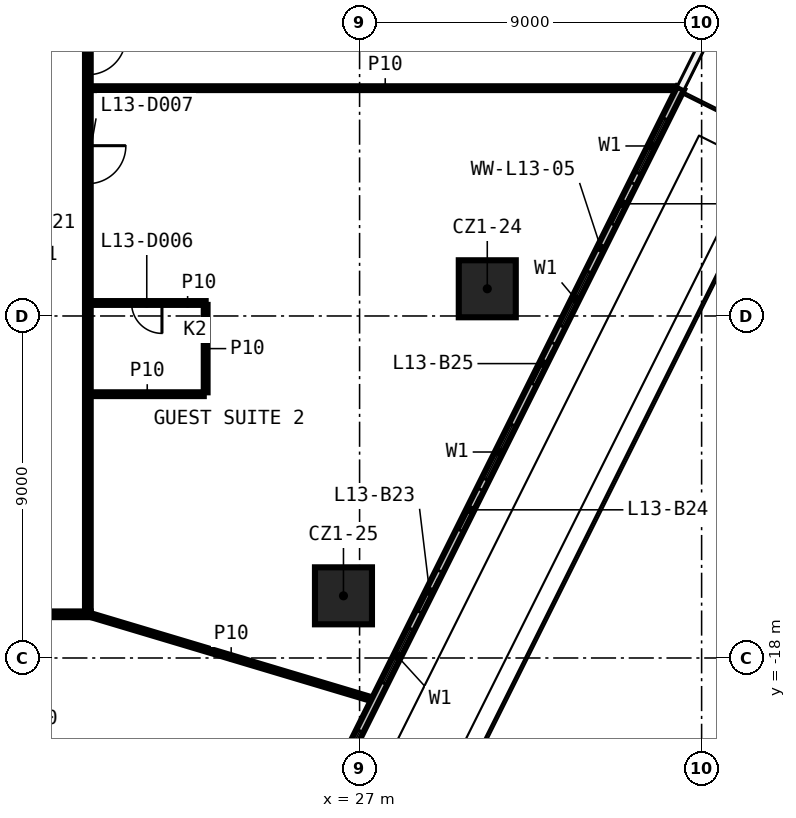
"""IFC4 building model, lengths in metres.
Left out: names, types, materials, properties, quantities, classifications, styles, units other than length and angle.
Written with IfcOpenShell. Run it as: python <this file> out.ifc"""

import sys

from ifc_helpers import new_model, si_unit, direction, frame, frame_2d, origin, origin_2d, place, context, subcontext, project, spatial, rectangle, extrude, element, fill, save


model = new_model("IFC4")
c1 = context("Model", 3, precision=1e-05, world=origin(), true_north=direction((0.0, 1.0)))
c2 = subcontext(c1, "Body", "Model", "MODEL_VIEW")
j1 = project(units=[si_unit("LENGTHUNIT", "METRE"), si_unit("PLANEANGLEUNIT", "RADIAN")], contexts=[c1])
p1 = place(None, origin())
s1 = spatial("IfcSite", under=j1, at=p1, CompositionType="ELEMENT")
p2 = place(p1, origin())
s2 = spatial("IfcBuilding", under=s1, at=p2, CompositionType="ELEMENT")
p3 = place(p2, frame((0.0, 0.0, 69.9)))
s3 = spatial("IfcBuildingStorey", under=s2, at=p3, CompositionType="ELEMENT", Elevation=69.9)
for number, where, z_axis, x_axis in (
    (1, (30.36, -8.284, 0.0), (0.0, 0.0, 1.0), (1.0, 0.0, 0.0)),
    (2, (26.576, -16.364, 0.0), (0.0, 0.0, 1.0), (1.0, 0.0, 0.0)),
):
    element("IfcColumn", number, at=place(p3, frame(where, z_axis=z_axis, x_axis=x_axis)), inside=s3, PredefinedType="COLUMN", context=c2, shape_type="SweptSolid", body=[
        extrude(rectangle(XDim=1.5, YDim=1.5, at=origin_2d()), origin(), (0.0, 0.0, 1.0), 3.3),
    ])
p4 = place(p3, frame((19.925, -16.85, 0.0), z_axis=(0.0, 0.0, 1.0), x_axis=(-1.0, 0.0, 0.0)))
e3 = element("IfcWall", 3, at=p4, inside=s3, PredefinedType="PARTITIONING", context=c2, shape_type="SweptSolid", body=[
    extrude(rectangle(XDim=39.85, YDim=0.15, at=frame_2d((19.925, 0.0))), origin(), (0.0, 0.0, 1.0), 3.3),
])
p5 = place(p4, frame((30.959, 0.0, 0.0)))
e4 = element("IfcOpeningElement", 4, at=p5, cuts=e3, PredefinedType="OPENING", context=c2, shape_type="SweptSolid", body=[
    extrude(rectangle(XDim=0.9, YDim=2.1, at=frame_2d((0.45, 1.05))), frame((0.0, 0.085, 0.0), z_axis=(0.0, -1.0, 0.0), x_axis=(1.0, 0.0, 0.0)), (0.0, 0.0, 1.0), 0.17),
])
p6 = place(p4, frame((22.077, 0.0, 0.0)))
e5 = element("IfcOpeningElement", 5, at=p6, cuts=e3, PredefinedType="OPENING", context=c2, shape_type="SweptSolid", body=[
    extrude(rectangle(XDim=0.9, YDim=2.1, at=frame_2d((0.45, 1.05))), frame((0.0, 0.085, 0.0), z_axis=(0.0, -1.0, 0.0), x_axis=(1.0, 0.0, 0.0)), (0.0, 0.0, 1.0), 0.17),
])
p7 = place(p3, frame((19.925, -11.058, 0.0), z_axis=(0.0, 0.0, 1.0), x_axis=(1.0, 0.0, 0.0)))
e6 = element("IfcWall", 6, at=p7, inside=s3, PredefinedType="PARTITIONING", context=c2, shape_type="SweptSolid", body=[
    extrude(rectangle(XDim=2.975, YDim=0.1, at=frame_2d((1.487, 0.0))), origin(), (0.0, 0.0, 1.0), 3.3),
])
p8 = place(p3, frame((22.95, -8.658, 0.0), z_axis=(0.0, 0.0, 1.0), x_axis=(-1.0, 0.0, 0.0)))
e7 = element("IfcWall", 7, at=p8, inside=s3, PredefinedType="PARTITIONING", context=c2, shape_type="SweptSolid", body=[
    extrude(rectangle(XDim=3.025, YDim=0.1, at=frame_2d((1.512, 0.0))), origin(), (0.0, 0.0, 1.0), 3.3),
])
p9 = place(p8, frame((1.15, 0.0, 0.0)))
e8 = element("IfcOpeningElement", 8, at=p9, cuts=e7, PredefinedType="OPENING", context=c2, shape_type="SweptSolid", body=[
    extrude(rectangle(XDim=0.8, YDim=2.1, at=frame_2d((0.4, 1.05))), frame((0.0, 0.06, 0.0), z_axis=(0.0, -1.0, 0.0), x_axis=(1.0, 0.0, 0.0)), (0.0, 0.0, 1.0), 0.12),
])
p10 = place(p3, frame((19.925, -3.005, 0.0), z_axis=(0.0, 0.0, 1.0), x_axis=(1.0, 0.0, 0.0)))
e9 = element("IfcWall", 9, at=p10, inside=s3, PredefinedType="PARTITIONING", context=c2, shape_type="SweptSolid", body=[
    extrude(rectangle(XDim=15.5, YDim=0.1, at=frame_2d((7.75, 0.0))), origin(), (0.0, 0.0, 1.0), 3.3),
])
p11 = place(p3, frame((22.95, -11.009, 0.0), z_axis=(0.0, 0.0, 1.0), x_axis=(0.0, 1.0, 0.0)))
e10 = element("IfcWall", 10, at=p11, inside=s3, PredefinedType="PARTITIONING", context=c2, shape_type="SweptSolid", body=[
    extrude(rectangle(XDim=2.3, YDim=0.1, at=frame_2d((1.15, 0.0))), origin(), (0.0, 0.0, 1.0), 3.3),
])
p12 = place(p3, frame((19.85, 16.775, 0.0), z_axis=(0.0, 0.0, 1.0), x_axis=(0.0, -1.0, 0.0)))
e11 = element("IfcWall", 11, at=p12, inside=s3, PredefinedType="PARTITIONING", context=c2, shape_type="SweptSolid", body=[
    extrude(rectangle(XDim=33.55, YDim=0.15, at=frame_2d((16.775, 0.0))), origin(), (0.0, 0.0, 1.0), 3.3),
])
p13 = place(p12, frame((21.293, 0.0, 0.0)))
e12 = element("IfcOpeningElement", 12, at=p13, cuts=e11, PredefinedType="OPENING", context=c2, shape_type="SweptSolid", body=[
    extrude(rectangle(XDim=1.0, YDim=2.1, at=frame_2d((0.5, 1.05))), frame((0.0, 0.085, 0.0), z_axis=(0.0, -1.0, 0.0), x_axis=(1.0, 0.0, 0.0)), (0.0, 0.0, 1.0), 0.17),
])
p14 = place(p12, frame((18.427, 0.0, 0.0)))
e13 = element("IfcOpeningElement", 13, at=p14, cuts=e11, PredefinedType="OPENING", context=c2, shape_type="SweptSolid", body=[
    extrude(rectangle(XDim=1.0, YDim=2.1, at=frame_2d((0.5, 1.05))), frame((0.0, 0.085, 0.0), z_axis=(0.0, -1.0, 0.0), x_axis=(1.0, 0.0, 0.0)), (0.0, 0.0, 1.0), 0.17),
])
p15 = place(p12, frame((4.211, 0.0, 0.0)))
e14 = element("IfcOpeningElement", 14, at=p15, cuts=e11, PredefinedType="OPENING", context=c2, shape_type="SweptSolid", body=[
    extrude(rectangle(XDim=0.9, YDim=2.1, at=frame_2d((0.45, 1.05))), frame((0.0, 0.085, 0.0), z_axis=(0.0, -1.0, 0.0), x_axis=(1.0, 0.0, 0.0)), (0.0, 0.0, 1.0), 0.17),
])
p16 = place(p3, frame((19.85, -16.85, 0.0), z_axis=(0.0, 0.0, 1.0), x_axis=(0.958075156501, -0.286517005597, 0.0)))
e15 = element("IfcWall", 15, at=p16, inside=s3, PredefinedType="PARTITIONING", context=c2, shape_type="SweptSolid", body=[
    extrude(rectangle(XDim=7.873, YDim=0.1, at=frame_2d((3.936, 0.0))), origin(), (0.0, 0.0, 1.0), 3.3),
])
p17 = place(p3, frame((23.394, -27.165, 0.0), z_axis=(0.0, 0.0, 1.0), x_axis=(0.446421309396, 0.894822895615, 0.0)))
e16 = element("IfcWall", 16, at=p17, inside=s3, PredefinedType="SOLIDWALL", context=c2, shape_type="SweptSolid", body=[
    extrude(rectangle(XDim=27.0, YDim=0.2, at=frame_2d((13.5, 0.0))), origin(), (0.0, 0.0, 1.0), 3.3),
])
p18 = place(p17, frame((0.5, 0.0, 0.6)))
e17 = element("IfcOpeningElement", 17, at=p18, cuts=e16, PredefinedType="OPENING", context=c2, shape_type="SweptSolid", body=[
    extrude(rectangle(XDim=1.6, YDim=2.4, at=frame_2d((0.8, 1.2))), frame((0.0, 0.11, 0.0), z_axis=(0.0, -1.0, 0.0), x_axis=(1.0, 0.0, 0.0)), (0.0, 0.0, 1.0), 0.22),
])
p19 = place(p17, frame((3.0, 0.0, 0.0)))
e18 = element("IfcOpeningElement", 18, at=p19, cuts=e16, PredefinedType="OPENING", context=c2, shape_type="SweptSolid", body=[
    extrude(rectangle(XDim=1.2, YDim=2.4, at=frame_2d((0.6, 1.2))), frame((0.0, 0.11, 0.0), z_axis=(0.0, -1.0, 0.0), x_axis=(1.0, 0.0, 0.0)), (0.0, 0.0, 1.0), 0.22),
])
p20 = place(p17, frame((6.5, 0.0, 0.6)))
e19 = element("IfcOpeningElement", 19, at=p20, cuts=e16, PredefinedType="OPENING", context=c2, shape_type="SweptSolid", body=[
    extrude(rectangle(XDim=1.6, YDim=2.4, at=frame_2d((0.8, 1.2))), frame((0.0, 0.11, 0.0), z_axis=(0.0, -1.0, 0.0), x_axis=(1.0, 0.0, 0.0)), (0.0, 0.0, 1.0), 0.22),
])
p21 = place(p17, frame((5.0, 0.0, 0.0)))
e20 = element("IfcOpeningElement", 20, at=p21, cuts=e16, PredefinedType="OPENING", context=c2, shape_type="SweptSolid", body=[
    extrude(rectangle(XDim=1.2, YDim=2.4, at=frame_2d((0.6, 1.2))), frame((0.0, 0.11, 0.0), z_axis=(0.0, -1.0, 0.0), x_axis=(1.0, 0.0, 0.0)), (0.0, 0.0, 1.0), 0.22),
])
p22 = place(p17, frame((9.5, 0.0, 0.6)))
e21 = element("IfcOpeningElement", 21, at=p22, cuts=e16, PredefinedType="OPENING", context=c2, shape_type="SweptSolid", body=[
    extrude(rectangle(XDim=1.6, YDim=2.4, at=frame_2d((0.8, 1.2))), frame((0.0, 0.11, 0.0), z_axis=(0.0, -1.0, 0.0), x_axis=(1.0, 0.0, 0.0)), (0.0, 0.0, 1.0), 0.22),
])
p23 = place(p17, frame((11.6, 0.0, 0.0)))
e22 = element("IfcOpeningElement", 22, at=p23, cuts=e16, PredefinedType="OPENING", context=c2, shape_type="SweptSolid", body=[
    extrude(rectangle(XDim=1.2, YDim=2.4, at=frame_2d((0.6, 1.2))), frame((0.0, 0.11, 0.0), z_axis=(0.0, -1.0, 0.0), x_axis=(1.0, 0.0, 0.0)), (0.0, 0.0, 1.0), 0.22),
])
p24 = place(p17, frame((15.5, 0.0, 0.6)))
e23 = element("IfcOpeningElement", 23, at=p24, cuts=e16, PredefinedType="OPENING", context=c2, shape_type="SweptSolid", body=[
    extrude(rectangle(XDim=1.6, YDim=2.4, at=frame_2d((0.8, 1.2))), frame((0.0, 0.11, 0.0), z_axis=(0.0, -1.0, 0.0), x_axis=(1.0, 0.0, 0.0)), (0.0, 0.0, 1.0), 0.22),
])
p25 = place(p17, frame((14.0, 0.0, 0.0)))
e24 = element("IfcOpeningElement", 24, at=p25, cuts=e16, PredefinedType="OPENING", context=c2, shape_type="SweptSolid", body=[
    extrude(rectangle(XDim=1.2, YDim=2.4, at=frame_2d((0.6, 1.2))), frame((0.0, 0.11, 0.0), z_axis=(0.0, -1.0, 0.0), x_axis=(1.0, 0.0, 0.0)), (0.0, 0.0, 1.0), 0.22),
])
p26 = place(p17, frame((20.0, 0.0, 0.6)))
e25 = element("IfcOpeningElement", 25, at=p26, cuts=e16, PredefinedType="OPENING", context=c2, shape_type="SweptSolid", body=[
    extrude(rectangle(XDim=1.6, YDim=2.4, at=frame_2d((0.8, 1.2))), frame((0.0, 0.11, 0.0), z_axis=(0.0, -1.0, 0.0), x_axis=(1.0, 0.0, 0.0)), (0.0, 0.0, 1.0), 0.22),
])
p27 = place(p17, frame((18.3, 0.0, 0.0)))
e26 = element("IfcOpeningElement", 26, at=p27, cuts=e16, PredefinedType="OPENING", context=c2, shape_type="SweptSolid", body=[
    extrude(rectangle(XDim=1.2, YDim=2.4, at=frame_2d((0.6, 1.2))), frame((0.0, 0.11, 0.0), z_axis=(0.0, -1.0, 0.0), x_axis=(1.0, 0.0, 0.0)), (0.0, 0.0, 1.0), 0.22),
])
p28 = place(p17, frame((24.5, 0.0, 0.6)))
e27 = element("IfcOpeningElement", 27, at=p28, cuts=e16, PredefinedType="OPENING", context=c2, shape_type="SweptSolid", body=[
    extrude(rectangle(XDim=1.6, YDim=2.4, at=frame_2d((0.8, 1.2))), frame((0.0, 0.11, 0.0), z_axis=(0.0, -1.0, 0.0), x_axis=(1.0, 0.0, 0.0)), (0.0, 0.0, 1.0), 0.22),
])
p29 = place(p17, frame((23.0, 0.0, 0.0)))
e28 = element("IfcOpeningElement", 28, at=p29, cuts=e16, PredefinedType="OPENING", context=c2, shape_type="SweptSolid", body=[
    extrude(rectangle(XDim=1.2, YDim=2.4, at=frame_2d((0.6, 1.2))), frame((0.0, 0.11, 0.0), z_axis=(0.0, -1.0, 0.0), x_axis=(1.0, 0.0, 0.0)), (0.0, 0.0, 1.0), 0.22),
])
p30 = place(p9, origin())
e29 = element("IfcDoor", 29, at=p30, inside=s3, OperationType="SINGLE_SWING_LEFT", PredefinedType="DOOR", context=c2, shape_type="SweptSolid", body=[
    extrude(rectangle(XDim=0.8, YDim=2.1, at=frame_2d((0.4, 1.05))), frame((0.0, 0.025, 0.0), z_axis=(0.0, -1.0, 0.0), x_axis=(1.0, 0.0, 0.0)), (0.0, 0.0, 1.0), 0.05),
])
fill(e8, e29)
p31 = place(p13, origin())
e30 = element("IfcDoor", 30, at=p31, inside=s3, OperationType="SINGLE_SWING_RIGHT", PredefinedType="DOOR", context=c2, shape_type="SweptSolid", body=[
    extrude(rectangle(XDim=1.0, YDim=2.1, at=frame_2d((0.5, 1.05))), frame((0.0, 0.025, 0.0), z_axis=(0.0, -1.0, 0.0), x_axis=(1.0, 0.0, 0.0)), (0.0, 0.0, 1.0), 0.05),
])
fill(e12, e30)
p32 = place(p14, origin())
e31 = element("IfcDoor", 31, at=p32, inside=s3, OperationType="SINGLE_SWING_LEFT", PredefinedType="DOOR", context=c2, shape_type="SweptSolid", body=[
    extrude(rectangle(XDim=1.0, YDim=2.1, at=frame_2d((0.5, 1.05))), frame((0.0, 0.025, 0.0), z_axis=(0.0, -1.0, 0.0), x_axis=(1.0, 0.0, 0.0)), (0.0, 0.0, 1.0), 0.05),
])
fill(e13, e31)
p33 = place(p20, origin())
e32 = element("IfcWindow", 32, at=p33, inside=s3, PartitioningType="SINGLE_PANEL", PredefinedType="WINDOW", context=c2, shape_type="SweptSolid", body=[
    extrude(rectangle(XDim=1.6, YDim=2.4, at=frame_2d((0.8, 1.2))), frame((0.0, 0.03, 0.0), z_axis=(0.0, -1.0, 0.0), x_axis=(1.0, 0.0, 0.0)), (0.0, 0.0, 1.0), 0.06),
])
fill(e19, e32)
p34 = place(p22, origin())
e33 = element("IfcWindow", 33, at=p34, inside=s3, PartitioningType="SINGLE_PANEL", PredefinedType="WINDOW", context=c2, shape_type="SweptSolid", body=[
    extrude(rectangle(XDim=1.6, YDim=2.4, at=frame_2d((0.8, 1.2))), frame((0.0, 0.03, 0.0), z_axis=(0.0, -1.0, 0.0), x_axis=(1.0, 0.0, 0.0)), (0.0, 0.0, 1.0), 0.06),
])
fill(e21, e33)
p35 = place(p23, origin())
e34 = element("IfcDoor", 34, at=p35, inside=s3, OperationType="SLIDING_TO_LEFT", PredefinedType="DOOR", context=c2, shape_type="SweptSolid", body=[
    extrude(rectangle(XDim=1.2, YDim=2.4, at=frame_2d((0.6, 1.2))), frame((0.0, 0.025, 0.0), z_axis=(0.0, -1.0, 0.0), x_axis=(1.0, 0.0, 0.0)), (0.0, 0.0, 1.0), 0.05),
])
fill(e22, e34)
p36 = place(p24, origin())
e35 = element("IfcWindow", 35, at=p36, inside=s3, PartitioningType="SINGLE_PANEL", PredefinedType="WINDOW", context=c2, shape_type="SweptSolid", body=[
    extrude(rectangle(XDim=1.6, YDim=2.4, at=frame_2d((0.8, 1.2))), frame((0.0, 0.03, 0.0), z_axis=(0.0, -1.0, 0.0), x_axis=(1.0, 0.0, 0.0)), (0.0, 0.0, 1.0), 0.06),
])
fill(e23, e35)
p37 = place(p25, origin())
e36 = element("IfcDoor", 36, at=p37, inside=s3, OperationType="SLIDING_TO_LEFT", PredefinedType="DOOR", context=c2, shape_type="SweptSolid", body=[
    extrude(rectangle(XDim=1.2, YDim=2.4, at=frame_2d((0.6, 1.2))), frame((0.0, 0.025, 0.0), z_axis=(0.0, -1.0, 0.0), x_axis=(1.0, 0.0, 0.0)), (0.0, 0.0, 1.0), 0.05),
])
fill(e24, e36)
p38 = place(p26, origin())
e37 = element("IfcWindow", 37, at=p38, inside=s3, PartitioningType="SINGLE_PANEL", PredefinedType="WINDOW", context=c2, shape_type="SweptSolid", body=[
    extrude(rectangle(XDim=1.6, YDim=2.4, at=frame_2d((0.8, 1.2))), frame((0.0, 0.03, 0.0), z_axis=(0.0, -1.0, 0.0), x_axis=(1.0, 0.0, 0.0)), (0.0, 0.0, 1.0), 0.06),
])
fill(e25, e37)
p39 = place(p27, origin())
e38 = element("IfcDoor", 38, at=p39, inside=s3, OperationType="SLIDING_TO_LEFT", PredefinedType="DOOR", context=c2, shape_type="SweptSolid", body=[
    extrude(rectangle(XDim=1.2, YDim=2.4, at=frame_2d((0.6, 1.2))), frame((0.0, 0.025, 0.0), z_axis=(0.0, -1.0, 0.0), x_axis=(1.0, 0.0, 0.0)), (0.0, 0.0, 1.0), 0.05),
])
fill(e26, e38)
p40 = place(p28, origin())
e39 = element("IfcWindow", 39, at=p40, inside=s3, PartitioningType="SINGLE_PANEL", PredefinedType="WINDOW", context=c2, shape_type="SweptSolid", body=[
    extrude(rectangle(XDim=1.6, YDim=2.4, at=frame_2d((0.8, 1.2))), frame((0.0, 0.03, 0.0), z_axis=(0.0, -1.0, 0.0), x_axis=(1.0, 0.0, 0.0)), (0.0, 0.0, 1.0), 0.06),
])
fill(e27, e39)
p41 = place(p29, origin())
e40 = element("IfcDoor", 40, at=p41, inside=s3, OperationType="SLIDING_TO_LEFT", PredefinedType="DOOR", context=c2, shape_type="SweptSolid", body=[
    extrude(rectangle(XDim=1.2, YDim=2.4, at=frame_2d((0.6, 1.2))), frame((0.0, 0.025, 0.0), z_axis=(0.0, -1.0, 0.0), x_axis=(1.0, 0.0, 0.0)), (0.0, 0.0, 1.0), 0.05),
])
fill(e28, e40)
save(model, sys.argv[1])
